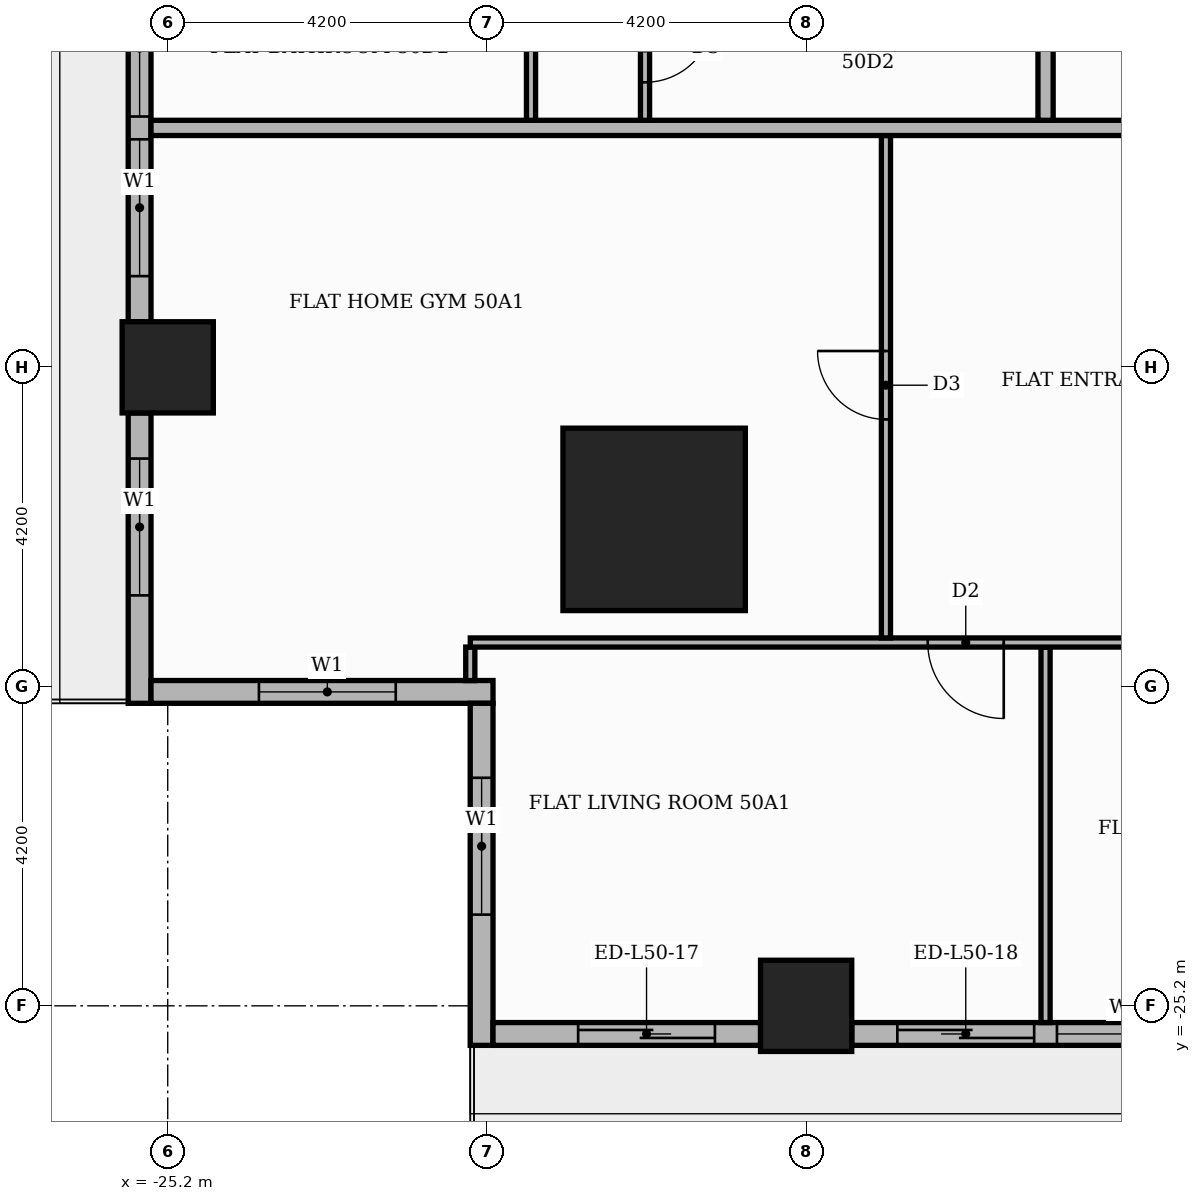
"""IFC4 building model, lengths in metres.
Left out: names, types, materials, properties, quantities, classifications, styles, units other than length and angle.
Written with IfcOpenShell. Run it as: python <this file> out.ifc"""

import sys

from ifc_helpers import new_model, si_unit, direction, frame, frame_2d, origin, origin_2d, place, context, subcontext, project, spatial, rectangle, extrude, element, fill, save


model = new_model("IFC4")
c1 = context("Model", 3, precision=1e-05, world=origin(), true_north=direction((0.0, 1.0)))
c2 = subcontext(c1, "Body", "Model", "MODEL_VIEW")
j1 = project(units=[si_unit("LENGTHUNIT", "METRE"), si_unit("PLANEANGLEUNIT", "RADIAN")], contexts=[c1])
p1 = place(None, origin())
s1 = spatial("IfcSite", under=j1, at=p1, CompositionType="ELEMENT")
p2 = place(p1, origin())
s2 = spatial("IfcBuilding", under=s1, at=p2, CompositionType="ELEMENT")
p3 = place(p2, frame((0.0, 0.0, 211.8)))
s3 = spatial("IfcBuildingStorey", under=s2, at=p3, CompositionType="ELEMENT", Elevation=211.8)
p4 = place(p3, frame((-18.8, -18.8, 0.0), z_axis=(0.0, 0.0, 1.0), x_axis=(1.0, 0.0, 0.0)))
e1 = element("IfcColumn", 1, at=p4, inside=s3, PredefinedType="COLUMN", context=c2, shape_type="SweptSolid", body=[
    extrude(rectangle(XDim=2.4, YDim=2.4, at=origin_2d()), origin(), (0.0, 0.0, 1.0), 3.9),
])
for number, where, z_axis, x_axis in (
    (2, (-16.8, -25.2, 0.0), (0.0, 0.0, 1.0), (1.0, 0.0, 0.0)),
    (3, (-25.2, -16.8, 0.0), (0.0, 0.0, 1.0), (1.0, 0.0, 0.0)),
):
    element("IfcColumn", number, at=place(p3, frame(where, z_axis=z_axis, x_axis=x_axis)), inside=s3, PredefinedType="COLUMN", context=c2, shape_type="SweptSolid", body=[
        extrude(rectangle(XDim=1.2, YDim=1.2, at=origin_2d()), origin(), (0.0, 0.0, 1.0), 3.9),
    ])
p5 = place(p3, frame((-25.57, -9.0, 0.0), z_axis=(0.0, 0.0, 1.0), x_axis=(0.0, -1.0, 0.0)))
e4 = element("IfcWall", 4, at=p5, inside=s3, PredefinedType="STANDARD", context=c2, shape_type="SweptSolid", body=[
    extrude(rectangle(XDim=7.2, YDim=0.3, at=frame_2d((3.6, 0.0))), origin(), (0.0, 0.0, 1.0), 3.48),
])
p6 = place(p5, frame((0.6, 0.0, 0.9)))
e5 = element("IfcOpeningElement", 5, at=p6, cuts=e4, PredefinedType="OPENING", context=c2, shape_type="SweptSolid", body=[
    extrude(rectangle(XDim=1.8, YDim=2.1, at=frame_2d((0.9, 1.05))), frame((0.0, 0.16, 0.0), z_axis=(0.0, -1.0, 0.0), x_axis=(1.0, 0.0, 0.0)), (0.0, 0.0, 1.0), 0.32),
])
p7 = place(p5, frame((2.7, 0.0, 0.9)))
e6 = element("IfcOpeningElement", 6, at=p7, cuts=e4, PredefinedType="OPENING", context=c2, shape_type="SweptSolid", body=[
    extrude(rectangle(XDim=1.8, YDim=2.1, at=frame_2d((0.9, 1.05))), frame((0.0, 0.16, 0.0), z_axis=(0.0, -1.0, 0.0), x_axis=(1.0, 0.0, 0.0)), (0.0, 0.0, 1.0), 0.32),
])
p8 = place(p5, frame((4.8, 0.0, 0.9)))
e7 = element("IfcOpeningElement", 7, at=p8, cuts=e4, PredefinedType="OPENING", context=c2, shape_type="SweptSolid", body=[
    extrude(rectangle(XDim=1.8, YDim=2.1, at=frame_2d((0.9, 1.05))), frame((0.0, 0.16, 0.0), z_axis=(0.0, -1.0, 0.0), x_axis=(1.0, 0.0, 0.0)), (0.0, 0.0, 1.0), 0.32),
])
p9 = place(p3, frame((-25.57, -17.4, 0.0), z_axis=(0.0, 0.0, 1.0), x_axis=(0.0, -1.0, 0.0)))
e8 = element("IfcWall", 8, at=p9, inside=s3, PredefinedType="STANDARD", context=c2, shape_type="SweptSolid", body=[
    extrude(rectangle(XDim=3.82, YDim=0.3, at=frame_2d((1.91, 0.0))), origin(), (0.0, 0.0, 1.0), 3.48),
])
p10 = place(p9, frame((0.6, 0.0, 0.9)))
e9 = element("IfcOpeningElement", 9, at=p10, cuts=e8, PredefinedType="OPENING", context=c2, shape_type="SweptSolid", body=[
    extrude(rectangle(XDim=1.8, YDim=2.1, at=frame_2d((0.9, 1.05))), frame((0.0, 0.16, 0.0), z_axis=(0.0, -1.0, 0.0), x_axis=(1.0, 0.0, 0.0)), (0.0, 0.0, 1.0), 0.32),
])
p11 = place(p3, frame((-25.42, -21.07, 0.0), z_axis=(0.0, 0.0, 1.0), x_axis=(1.0, 0.0, 0.0)))
e10 = element("IfcWall", 10, at=p11, inside=s3, PredefinedType="STANDARD", context=c2, shape_type="SweptSolid", body=[
    extrude(rectangle(XDim=4.5, YDim=0.3, at=frame_2d((2.25, 0.0))), origin(), (0.0, 0.0, 1.0), 3.48),
])
p12 = place(p11, frame((1.42, 0.0, 0.9)))
e11 = element("IfcOpeningElement", 11, at=p12, cuts=e10, PredefinedType="OPENING", context=c2, shape_type="SweptSolid", body=[
    extrude(rectangle(XDim=1.8, YDim=2.1, at=frame_2d((0.9, 1.05))), frame((0.0, 0.16, 0.0), z_axis=(0.0, -1.0, 0.0), x_axis=(1.0, 0.0, 0.0)), (0.0, 0.0, 1.0), 0.32),
])
p13 = place(p3, frame((-21.07, -21.22, 0.0), z_axis=(0.0, 0.0, 1.0), x_axis=(0.0, -1.0, 0.0)))
e12 = element("IfcWall", 12, at=p13, inside=s3, PredefinedType="STANDARD", context=c2, shape_type="SweptSolid", body=[
    extrude(rectangle(XDim=4.5, YDim=0.3, at=frame_2d((2.25, 0.0))), origin(), (0.0, 0.0, 1.0), 3.48),
])
p14 = place(p13, frame((0.98, 0.0, 0.9)))
e13 = element("IfcOpeningElement", 13, at=p14, cuts=e12, PredefinedType="OPENING", context=c2, shape_type="SweptSolid", body=[
    extrude(rectangle(XDim=1.8, YDim=2.1, at=frame_2d((0.9, 1.05))), frame((0.0, 0.16, 0.0), z_axis=(0.0, -1.0, 0.0), x_axis=(1.0, 0.0, 0.0)), (0.0, 0.0, 1.0), 0.32),
])
p15 = place(p3, frame((-20.92, -25.57, 0.0), z_axis=(0.0, 0.0, 1.0), x_axis=(1.0, 0.0, 0.0)))
e14 = element("IfcWall", 14, at=p15, inside=s3, PredefinedType="STANDARD", context=c2, shape_type="SweptSolid", body=[
    extrude(rectangle(XDim=3.52, YDim=0.3, at=frame_2d((1.76, 0.0))), origin(), (0.0, 0.0, 1.0), 3.48),
])
p16 = place(p15, frame((1.12, 0.0, 0.0)))
e15 = element("IfcOpeningElement", 15, at=p16, cuts=e14, PredefinedType="OPENING", context=c2, shape_type="SweptSolid", body=[
    extrude(rectangle(XDim=1.8, YDim=2.4, at=frame_2d((0.9, 1.2))), frame((0.0, 0.16, 0.0), z_axis=(0.0, -1.0, 0.0), x_axis=(1.0, 0.0, 0.0)), (0.0, 0.0, 1.0), 0.32),
])
p17 = place(p3, frame((-16.2, -25.57, 0.0), z_axis=(0.0, 0.0, 1.0), x_axis=(1.0, 0.0, 0.0)))
e16 = element("IfcWall", 16, at=p17, inside=s3, PredefinedType="STANDARD", context=c2, shape_type="SweptSolid", body=[
    extrude(rectangle(XDim=7.2, YDim=0.3, at=frame_2d((3.6, 0.0))), origin(), (0.0, 0.0, 1.0), 3.48),
])
p18 = place(p17, frame((0.6, 0.0, 0.0)))
e17 = element("IfcOpeningElement", 17, at=p18, cuts=e16, PredefinedType="OPENING", context=c2, shape_type="SweptSolid", body=[
    extrude(rectangle(XDim=1.8, YDim=2.4, at=frame_2d((0.9, 1.2))), frame((0.0, 0.16, 0.0), z_axis=(0.0, -1.0, 0.0), x_axis=(1.0, 0.0, 0.0)), (0.0, 0.0, 1.0), 0.32),
])
p19 = place(p17, frame((2.7, 0.0, 0.9)))
e18 = element("IfcOpeningElement", 18, at=p19, cuts=e16, PredefinedType="OPENING", context=c2, shape_type="SweptSolid", body=[
    extrude(rectangle(XDim=1.8, YDim=2.1, at=frame_2d((0.9, 1.05))), frame((0.0, 0.16, 0.0), z_axis=(0.0, -1.0, 0.0), x_axis=(1.0, 0.0, 0.0)), (0.0, 0.0, 1.0), 0.32),
])
p20 = place(p17, frame((4.8, 0.0, 0.0)))
e19 = element("IfcOpeningElement", 19, at=p20, cuts=e16, PredefinedType="OPENING", context=c2, shape_type="SweptSolid", body=[
    extrude(rectangle(XDim=1.8, YDim=2.4, at=frame_2d((0.9, 1.2))), frame((0.0, 0.16, 0.0), z_axis=(0.0, -1.0, 0.0), x_axis=(1.0, 0.0, 0.0)), (0.0, 0.0, 1.0), 0.32),
])
p21 = place(p3, frame((-13.65, -25.42, 0.0), z_axis=(0.0, 0.0, 1.0), x_axis=(0.0, 1.0, 0.0)))
e20 = element("IfcWall", 20, at=p21, inside=s3, PredefinedType="PARTITIONING", context=c2, shape_type="SweptSolid", body=[
    extrude(rectangle(XDim=4.94, YDim=0.12, at=frame_2d((2.47, 0.0))), origin(), (0.0, 0.0, 1.0), 3.48),
])
p22 = place(p3, frame((-21.219, -20.921, 0.0), z_axis=(0.0, 0.0, 1.0), x_axis=(0.0, 1.0, 0.0)))
e21 = element("IfcWall", 21, at=p22, inside=s3, PredefinedType="PARTITIONING", context=c2, shape_type="SweptSolid", body=[
    extrude(rectangle(XDim=0.441, YDim=0.12, at=frame_2d((0.22, 0.0))), origin(), (0.0, 0.0, 1.0), 3.48),
])
p23 = place(p3, frame((-21.219, -20.42, 0.0), z_axis=(0.0, 0.0, 1.0), x_axis=(1.0, 0.0, 0.0)))
e22 = element("IfcWall", 22, at=p23, inside=s3, PredefinedType="PARTITIONING", context=c2, shape_type="SweptSolid", body=[
    extrude(rectangle(XDim=34.769, YDim=0.12, at=frame_2d((17.385, 0.0))), origin(), (0.0, 0.0, 1.0), 3.48),
])
p24 = place(p23, frame((6.019, 0.0, 0.0)))
e23 = element("IfcOpeningElement", 23, at=p24, cuts=e22, PredefinedType="OPENING", context=c2, shape_type="SweptSolid", body=[
    extrude(rectangle(XDim=1.0, YDim=2.1, at=frame_2d((0.5, 1.05))), frame((0.0, 0.07, 0.0), z_axis=(0.0, -1.0, 0.0), x_axis=(1.0, 0.0, 0.0)), (0.0, 0.0, 1.0), 0.14),
])
p25 = place(p23, frame((11.269, 0.0, 0.0)))
e24 = element("IfcOpeningElement", 24, at=p25, cuts=e22, PredefinedType="OPENING", context=c2, shape_type="SweptSolid", body=[
    extrude(rectangle(XDim=1.0, YDim=2.1, at=frame_2d((0.5, 1.05))), frame((0.0, 0.07, 0.0), z_axis=(0.0, -1.0, 0.0), x_axis=(1.0, 0.0, 0.0)), (0.0, 0.0, 1.0), 0.14),
])
p26 = place(p23, frame((19.719, 0.0, 0.0)))
e25 = element("IfcOpeningElement", 25, at=p26, cuts=e22, PredefinedType="OPENING", context=c2, shape_type="SweptSolid", body=[
    extrude(rectangle(XDim=0.9, YDim=2.1, at=frame_2d((0.45, 1.05))), frame((0.0, 0.07, 0.0), z_axis=(0.0, -1.0, 0.0), x_axis=(1.0, 0.0, 0.0)), (0.0, 0.0, 1.0), 0.14),
])
p27 = place(p23, frame((30.219, 0.0, 0.0)))
e26 = element("IfcOpeningElement", 26, at=p27, cuts=e22, PredefinedType="OPENING", context=c2, shape_type="SweptSolid", body=[
    extrude(rectangle(XDim=0.9, YDim=2.1, at=frame_2d((0.45, 1.05))), frame((0.0, 0.07, 0.0), z_axis=(0.0, -1.0, 0.0), x_axis=(1.0, 0.0, 0.0)), (0.0, 0.0, 1.0), 0.14),
])
p28 = place(p3, frame((-15.75, -20.36, 0.0), z_axis=(0.0, 0.0, 1.0), x_axis=(0.0, 1.0, 0.0)))
e27 = element("IfcWall", 27, at=p28, inside=s3, PredefinedType="PARTITIONING", context=c2, shape_type="SweptSolid", body=[
    extrude(rectangle(XDim=6.61, YDim=0.12, at=frame_2d((3.305, 0.0))), origin(), (0.0, 0.0, 1.0), 3.48),
])
p29 = place(p28, frame((2.875, 0.0, 0.0)))
e28 = element("IfcOpeningElement", 28, at=p29, cuts=e27, PredefinedType="OPENING", context=c2, shape_type="SweptSolid", body=[
    extrude(rectangle(XDim=0.9, YDim=2.1, at=frame_2d((0.45, 1.05))), frame((0.0, 0.07, 0.0), z_axis=(0.0, -1.0, 0.0), x_axis=(1.0, 0.0, 0.0)), (0.0, 0.0, 1.0), 0.14),
])
p30 = place(p3, frame((-25.42, -13.65, 0.0), z_axis=(0.0, 0.0, 1.0), x_axis=(1.0, 0.0, 0.0)))
e29 = element("IfcWall", 29, at=p30, inside=s3, PredefinedType="PARTITIONING", context=c2, shape_type="SweptSolid", body=[
    extrude(rectangle(XDim=39.07, YDim=0.2, at=frame_2d((19.535, 0.0))), origin(), (0.0, 0.0, 1.0), 3.48),
])
p31 = place(p30, frame((13.32, 0.0, 0.0)))
e30 = element("IfcOpeningElement", 30, at=p31, cuts=e29, PredefinedType="OPENING", context=c2, shape_type="SweptSolid", body=[
    extrude(rectangle(XDim=1.1, YDim=2.4, at=frame_2d((0.55, 1.2))), frame((0.0, 0.11, 0.0), z_axis=(0.0, -1.0, 0.0), x_axis=(1.0, 0.0, 0.0)), (0.0, 0.0, 1.0), 0.22),
])
p32 = place(p3, frame((-20.42, -13.55, 0.0), z_axis=(0.0, 0.0, 1.0), x_axis=(0.0, 1.0, 0.0)))
e31 = element("IfcWall", 31, at=p32, inside=s3, PredefinedType="PARTITIONING", context=c2, shape_type="SweptSolid", body=[
    extrude(rectangle(XDim=1.94, YDim=0.12, at=frame_2d((0.97, 0.0))), origin(), (0.0, 0.0, 1.0), 3.48),
])
p33 = place(p3, frame((-18.92, -13.55, 0.0), z_axis=(0.0, 0.0, 1.0), x_axis=(0.0, 1.0, 0.0)))
e32 = element("IfcWall", 32, at=p33, inside=s3, PredefinedType="PARTITIONING", context=c2, shape_type="SweptSolid", body=[
    extrude(rectangle(XDim=1.94, YDim=0.12, at=frame_2d((0.97, 0.0))), origin(), (0.0, 0.0, 1.0), 3.48),
])
p34 = place(p33, frame((0.5, 0.0, 0.0)))
e33 = element("IfcOpeningElement", 33, at=p34, cuts=e32, PredefinedType="OPENING", context=c2, shape_type="SweptSolid", body=[
    extrude(rectangle(XDim=0.9, YDim=2.1, at=frame_2d((0.45, 1.05))), frame((0.0, 0.07, 0.0), z_axis=(0.0, -1.0, 0.0), x_axis=(1.0, 0.0, 0.0)), (0.0, 0.0, 1.0), 0.14),
])
p35 = place(p3, frame((-13.65, -13.55, 0.0), z_axis=(0.0, 0.0, 1.0), x_axis=(0.0, 1.0, 0.0)))
e34 = element("IfcWall", 34, at=p35, inside=s3, PredefinedType="PARTITIONING", context=c2, shape_type="SweptSolid", body=[
    extrude(rectangle(XDim=18.7, YDim=0.2, at=frame_2d((9.35, 0.0))), origin(), (0.0, 0.0, 1.0), 3.48),
])
p36 = place(p35, frame((16.15, 0.0, 0.0)))
e35 = element("IfcOpeningElement", 35, at=p36, cuts=e34, PredefinedType="OPENING", context=c2, shape_type="SweptSolid", body=[
    extrude(rectangle(XDim=1.1, YDim=2.4, at=frame_2d((0.55, 1.2))), frame((0.0, 0.11, 0.0), z_axis=(0.0, -1.0, 0.0), x_axis=(1.0, 0.0, 0.0)), (0.0, 0.0, 1.0), 0.22),
])
p37 = place(p7, origin())
e36 = element("IfcWindow", 36, at=p37, inside=s3, PartitioningType="SINGLE_PANEL", PredefinedType="WINDOW", context=c2, shape_type="SweptSolid", body=[
    extrude(rectangle(XDim=1.8, YDim=2.1, at=frame_2d((0.9, 1.05))), frame((0.0, 0.03, 0.0), z_axis=(0.0, -1.0, 0.0), x_axis=(1.0, 0.0, 0.0)), (0.0, 0.0, 1.0), 0.06),
])
fill(e6, e36)
p38 = place(p8, origin())
e37 = element("IfcWindow", 37, at=p38, inside=s3, PartitioningType="SINGLE_PANEL", PredefinedType="WINDOW", context=c2, shape_type="SweptSolid", body=[
    extrude(rectangle(XDim=1.8, YDim=2.1, at=frame_2d((0.9, 1.05))), frame((0.0, 0.03, 0.0), z_axis=(0.0, -1.0, 0.0), x_axis=(1.0, 0.0, 0.0)), (0.0, 0.0, 1.0), 0.06),
])
fill(e7, e37)
p39 = place(p10, origin())
e38 = element("IfcWindow", 38, at=p39, inside=s3, PartitioningType="SINGLE_PANEL", PredefinedType="WINDOW", context=c2, shape_type="SweptSolid", body=[
    extrude(rectangle(XDim=1.8, YDim=2.1, at=frame_2d((0.9, 1.05))), frame((0.0, 0.03, 0.0), z_axis=(0.0, -1.0, 0.0), x_axis=(1.0, 0.0, 0.0)), (0.0, 0.0, 1.0), 0.06),
])
fill(e9, e38)
p40 = place(p12, origin())
e39 = element("IfcWindow", 39, at=p40, inside=s3, PartitioningType="SINGLE_PANEL", PredefinedType="WINDOW", context=c2, shape_type="SweptSolid", body=[
    extrude(rectangle(XDim=1.8, YDim=2.1, at=frame_2d((0.9, 1.05))), frame((0.0, 0.03, 0.0), z_axis=(0.0, -1.0, 0.0), x_axis=(1.0, 0.0, 0.0)), (0.0, 0.0, 1.0), 0.06),
])
fill(e11, e39)
p41 = place(p14, origin())
e40 = element("IfcWindow", 40, at=p41, inside=s3, PartitioningType="SINGLE_PANEL", PredefinedType="WINDOW", context=c2, shape_type="SweptSolid", body=[
    extrude(rectangle(XDim=1.8, YDim=2.1, at=frame_2d((0.9, 1.05))), frame((0.0, 0.03, 0.0), z_axis=(0.0, -1.0, 0.0), x_axis=(1.0, 0.0, 0.0)), (0.0, 0.0, 1.0), 0.06),
])
fill(e13, e40)
p42 = place(p16, origin())
e41 = element("IfcDoor", 41, at=p42, inside=s3, OperationType="SLIDING_TO_RIGHT", PredefinedType="DOOR", context=c2, shape_type="SweptSolid", body=[
    extrude(rectangle(XDim=1.8, YDim=2.4, at=frame_2d((0.9, 1.2))), frame((0.0, 0.025, 0.0), z_axis=(0.0, -1.0, 0.0), x_axis=(1.0, 0.0, 0.0)), (0.0, 0.0, 1.0), 0.05),
])
fill(e15, e41)
p43 = place(p18, origin())
e42 = element("IfcDoor", 42, at=p43, inside=s3, OperationType="SLIDING_TO_LEFT", PredefinedType="DOOR", context=c2, shape_type="SweptSolid", body=[
    extrude(rectangle(XDim=1.8, YDim=2.4, at=frame_2d((0.9, 1.2))), frame((0.0, 0.025, 0.0), z_axis=(0.0, -1.0, 0.0), x_axis=(1.0, 0.0, 0.0)), (0.0, 0.0, 1.0), 0.05),
])
fill(e17, e42)
p44 = place(p19, origin())
e43 = element("IfcWindow", 43, at=p44, inside=s3, PartitioningType="SINGLE_PANEL", PredefinedType="WINDOW", context=c2, shape_type="SweptSolid", body=[
    extrude(rectangle(XDim=1.8, YDim=2.1, at=frame_2d((0.9, 1.05))), frame((0.0, 0.03, 0.0), z_axis=(0.0, -1.0, 0.0), x_axis=(1.0, 0.0, 0.0)), (0.0, 0.0, 1.0), 0.06),
])
fill(e18, e43)
p45 = place(p29, origin())
e44 = element("IfcDoor", 44, at=p45, inside=s3, OperationType="SINGLE_SWING_RIGHT", PredefinedType="DOOR", context=c2, shape_type="SweptSolid", body=[
    extrude(rectangle(XDim=0.9, YDim=2.1, at=frame_2d((0.45, 1.05))), frame((0.0, 0.025, 0.0), z_axis=(0.0, -1.0, 0.0), x_axis=(1.0, 0.0, 0.0)), (0.0, 0.0, 1.0), 0.05),
])
fill(e28, e44)
p46 = place(p24, frame((1.0, 0.0, 0.0), z_axis=(0.0, 0.0, 1.0), x_axis=(-1.0, 0.0, 0.0)))
e45 = element("IfcDoor", 45, at=p46, inside=s3, OperationType="SINGLE_SWING_RIGHT", PredefinedType="DOOR", context=c2, shape_type="SweptSolid", body=[
    extrude(rectangle(XDim=1.0, YDim=2.1, at=frame_2d((0.5, 1.05))), frame((0.0, 0.025, 0.0), z_axis=(0.0, -1.0, 0.0), x_axis=(1.0, 0.0, 0.0)), (0.0, 0.0, 1.0), 0.05),
])
fill(e23, e45)
p47 = place(p34, frame((0.9, 0.0, 0.0), z_axis=(0.0, 0.0, 1.0), x_axis=(-1.0, 0.0, 0.0)))
e46 = element("IfcDoor", 46, at=p47, inside=s3, OperationType="SINGLE_SWING_RIGHT", PredefinedType="DOOR", context=c2, shape_type="SweptSolid", body=[
    extrude(rectangle(XDim=0.9, YDim=2.1, at=frame_2d((0.45, 1.05))), frame((0.0, 0.025, 0.0), z_axis=(0.0, -1.0, 0.0), x_axis=(1.0, 0.0, 0.0)), (0.0, 0.0, 1.0), 0.05),
])
fill(e33, e46)
save(model, sys.argv[1])
